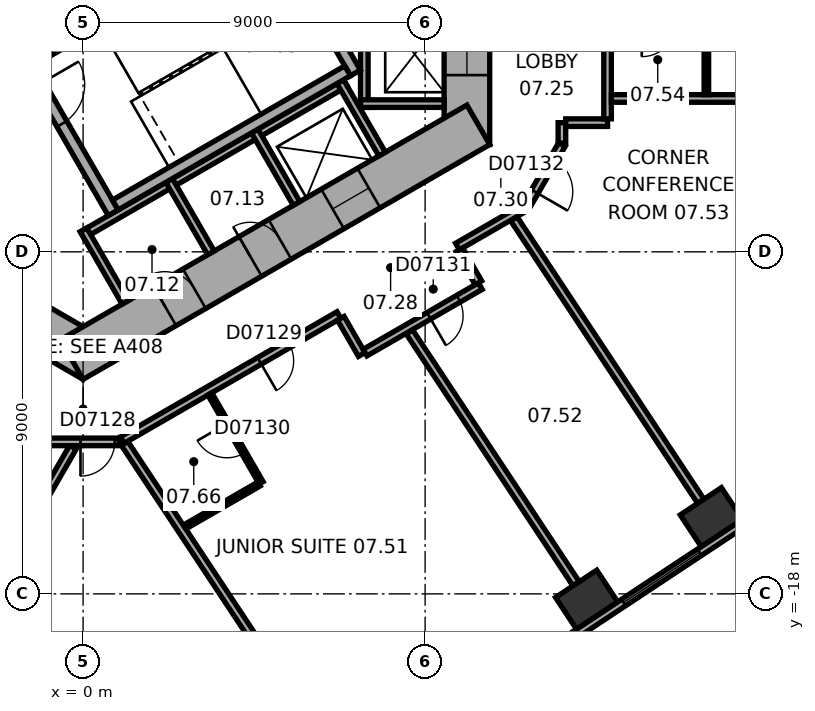
"""IFC4 building model, lengths in metres.
Left out: names, types, materials, properties, quantities, classifications, styles, units other than length and angle.
Written with IfcOpenShell. Run it as: python <this file> out.ifc"""

import sys

from ifc_helpers import new_model, si_unit, direction, frame, frame_2d, origin, origin_2d, place, context, subcontext, project, spatial, rectangle, extrude, element, fill, save


model = new_model("IFC4")
c1 = context("Model", 3, precision=1e-05, world=origin(), true_north=direction((0.0, 1.0)))
c2 = subcontext(c1, "Body", "Model", "MODEL_VIEW")
j1 = project(units=[si_unit("LENGTHUNIT", "METRE"), si_unit("PLANEANGLEUNIT", "RADIAN")], contexts=[c1])
p1 = place(None, origin())
s1 = spatial("IfcSite", under=j1, at=p1, CompositionType="ELEMENT")
p2 = place(p1, origin())
s2 = spatial("IfcBuilding", under=s1, at=p2, CompositionType="ELEMENT")
p3 = place(p2, frame((0.0, 0.0, 44.0)))
s3 = spatial("IfcBuildingStorey", under=s2, at=p3, CompositionType="ELEMENT", Elevation=44.0)
for number, where, z_axis, x_axis in (
    (1, (13.25, -18.152, 0.0), (0.0, 0.0, 1.0), (0.834, 0.552, 0.0)),
    (2, (16.531, -15.981, 0.0), (0.0, 0.0, 1.0), (0.834, 0.552, 0.0)),
):
    element("IfcColumn", number, at=place(p3, frame(where, z_axis=z_axis, x_axis=x_axis)), inside=s3, PredefinedType="COLUMN", context=c2, shape_type="SweptSolid", body=[
        extrude(rectangle(XDim=1.3, YDim=1.0, at=origin_2d()), origin(), (0.0, 0.0, 1.0), 3.3),
    ])
p4 = place(p3, frame((10.1, -6.177, 0.0), z_axis=(0.0, 0.0, 1.0), x_axis=(0.0, 1.0, 0.0)))
e3 = element("IfcWall", 3, at=p4, inside=s3, PredefinedType="SHEAR", context=c2, shape_type="SweptSolid", body=[
    extrude(rectangle(XDim=12.355, YDim=1.2, at=frame_2d((6.177, 0.0))), origin(), (0.0, 0.0, 1.0), 3.3),
])
p5 = place(p4, frame((6.378, 0.0, 0.0)))
e4 = element("IfcOpeningElement", 4, at=p5, cuts=e3, PredefinedType="OPENING", context=c2, shape_type="SweptSolid", body=[
    extrude(rectangle(XDim=1.5, YDim=2.1, at=frame_2d((0.75, 1.05))), frame((0.0, 0.61, 0.0), z_axis=(0.0, -1.0, 0.0), x_axis=(1.0, 0.0, 0.0)), (0.0, 0.0, 1.0), 1.22),
])
p6 = place(p4, frame((1.828, 0.0, 0.0)))
e5 = element("IfcOpeningElement", 5, at=p6, cuts=e3, PredefinedType="OPENING", context=c2, shape_type="SweptSolid", body=[
    extrude(rectangle(XDim=1.1, YDim=2.1, at=frame_2d((0.55, 1.05))), frame((0.0, 0.61, 0.0), z_axis=(0.0, -1.0, 0.0), x_axis=(1.0, 0.0, 0.0)), (0.0, 0.0, 1.0), 1.22),
])
p7 = place(p4, frame((4.427, 0.0, 0.0)))
e6 = element("IfcOpeningElement", 6, at=p7, cuts=e3, PredefinedType="OPENING", context=c2, shape_type="SweptSolid", body=[
    extrude(rectangle(XDim=1.1, YDim=2.1, at=frame_2d((0.55, 1.05))), frame((0.0, 0.61, 0.0), z_axis=(0.0, -1.0, 0.0), x_axis=(1.0, 0.0, 0.0)), (0.0, 0.0, 1.0), 1.22),
])
p8 = place(p3, frame((-10.4, -5.658, 0.0), z_axis=(0.0, 0.0, 1.0), x_axis=(0.866021384402, -0.500006961711, 0.0)))
e7 = element("IfcWall", 7, at=p8, inside=s3, PredefinedType="SHEAR", context=c2, shape_type="SweptSolid", body=[
    extrude(rectangle(XDim=12.355, YDim=1.2, at=frame_2d((6.178, 0.0))), origin(), (0.0, 0.0, 1.0), 3.3),
])
p9 = place(p8, frame((6.378, 0.0, 0.0)))
e8 = element("IfcOpeningElement", 8, at=p9, cuts=e7, PredefinedType="OPENING", context=c2, shape_type="SweptSolid", body=[
    extrude(rectangle(XDim=1.5, YDim=2.1, at=frame_2d((0.75, 1.05))), frame((0.0, 0.61, 0.0), z_axis=(0.0, -1.0, 0.0), x_axis=(1.0, 0.0, 0.0)), (0.0, 0.0, 1.0), 1.22),
])
p10 = place(p8, frame((3.228, 0.0, 0.0)))
e9 = element("IfcOpeningElement", 9, at=p10, cuts=e7, PredefinedType="OPENING", context=c2, shape_type="SweptSolid", body=[
    extrude(rectangle(XDim=0.9, YDim=2.1, at=frame_2d((0.45, 1.05))), frame((0.0, 0.61, 0.0), z_axis=(0.0, -1.0, 0.0), x_axis=(1.0, 0.0, 0.0)), (0.0, 0.0, 1.0), 1.22),
])
p11 = place(p3, frame((-0.3, -11.836, 0.0), z_axis=(0.0, 0.0, 1.0), x_axis=(0.866021384402, 0.500006961711, 0.0)))
e10 = element("IfcWall", 10, at=p11, inside=s3, PredefinedType="SHEAR", context=c2, shape_type="SweptSolid", body=[
    extrude(rectangle(XDim=12.355, YDim=1.2, at=frame_2d((6.178, 0.0))), origin(), (0.0, 0.0, 1.0), 3.3),
])
p12 = place(p11, frame((2.828, 0.0, 0.0)))
e11 = element("IfcOpeningElement", 11, at=p12, cuts=e10, PredefinedType="OPENING", context=c2, shape_type="SweptSolid", body=[
    extrude(rectangle(XDim=0.9, YDim=2.1, at=frame_2d((0.45, 1.05))), frame((0.0, 0.61, 0.0), z_axis=(0.0, -1.0, 0.0), x_axis=(1.0, 0.0, 0.0)), (0.0, 0.0, 1.0), 1.22),
])
p13 = place(p11, frame((5.428, 0.0, 0.0)))
e12 = element("IfcOpeningElement", 12, at=p13, cuts=e10, PredefinedType="OPENING", context=c2, shape_type="SweptSolid", body=[
    extrude(rectangle(XDim=0.9, YDim=2.1, at=frame_2d((0.45, 1.05))), frame((0.0, 0.61, 0.0), z_axis=(0.0, -1.0, 0.0), x_axis=(1.0, 0.0, 0.0)), (0.0, 0.0, 1.0), 1.22),
])
p14 = place(p11, frame((7.928, 0.0, 0.0)))
e13 = element("IfcOpeningElement", 13, at=p14, cuts=e10, PredefinedType="OPENING", context=c2, shape_type="SweptSolid", body=[
    extrude(rectangle(XDim=1.1, YDim=2.1, at=frame_2d((0.55, 1.05))), frame((0.0, 0.61, 0.0), z_axis=(0.0, -1.0, 0.0), x_axis=(1.0, 0.0, 0.0)), (0.0, 0.0, 1.0), 1.22),
])
p15 = place(p3, frame((3.083, -25.601, 0.0), z_axis=(0.0, 0.0, 1.0), x_axis=(0.833884295743, 0.551939291329, 0.0)))
e14 = element("IfcWall", 14, at=p15, inside=s3, PredefinedType="STANDARD", context=c2, shape_type="SweptSolid", body=[
    extrude(rectangle(XDim=21.246, YDim=0.2, at=frame_2d((10.623, 0.0))), origin(), (0.0, 0.0, 1.0), 3.3),
])
p16 = place(p15, frame((1.553, 0.0, 0.8)))
e15 = element("IfcOpeningElement", 15, at=p16, cuts=e14, PredefinedType="OPENING", context=c2, shape_type="SweptSolid", body=[
    extrude(rectangle(XDim=2.4, YDim=1.7, at=frame_2d((1.2, 0.85))), frame((0.0, 0.11, 0.0), z_axis=(0.0, -1.0, 0.0), x_axis=(1.0, 0.0, 0.0)), (0.0, 0.0, 1.0), 0.22),
])
p17 = place(p15, frame((5.488, 0.0, 0.8)))
e16 = element("IfcOpeningElement", 16, at=p17, cuts=e14, PredefinedType="OPENING", context=c2, shape_type="SweptSolid", body=[
    extrude(rectangle(XDim=2.4, YDim=1.7, at=frame_2d((1.2, 0.85))), frame((0.0, 0.11, 0.0), z_axis=(0.0, -1.0, 0.0), x_axis=(1.0, 0.0, 0.0)), (0.0, 0.0, 1.0), 0.22),
])
p18 = place(p15, frame((9.422, 0.0, 0.8)))
e17 = element("IfcOpeningElement", 17, at=p18, cuts=e14, PredefinedType="OPENING", context=c2, shape_type="SweptSolid", body=[
    extrude(rectangle(XDim=2.4, YDim=1.7, at=frame_2d((1.2, 0.85))), frame((0.0, 0.11, 0.0), z_axis=(0.0, -1.0, 0.0), x_axis=(1.0, 0.0, 0.0)), (0.0, 0.0, 1.0), 0.22),
])
p19 = place(p15, frame((13.357, 0.0, 0.8)))
e18 = element("IfcOpeningElement", 18, at=p19, cuts=e14, PredefinedType="OPENING", context=c2, shape_type="SweptSolid", body=[
    extrude(rectangle(XDim=2.4, YDim=1.7, at=frame_2d((1.2, 0.85))), frame((0.0, 0.11, 0.0), z_axis=(0.0, -1.0, 0.0), x_axis=(1.0, 0.0, 0.0)), (0.0, 0.0, 1.0), 0.22),
])
p20 = place(p15, frame((17.291, 0.0, 0.8)))
e19 = element("IfcOpeningElement", 19, at=p20, cuts=e14, PredefinedType="OPENING", context=c2, shape_type="SweptSolid", body=[
    extrude(rectangle(XDim=2.4, YDim=1.7, at=frame_2d((1.2, 0.85))), frame((0.0, 0.11, 0.0), z_axis=(0.0, -1.0, 0.0), x_axis=(1.0, 0.0, 0.0)), (0.0, 0.0, 1.0), 0.22),
])
p21 = place(p3, frame((7.4, -5.2, 0.0), z_axis=(0.0, 0.0, 1.0), x_axis=(0.0, 1.0, 0.0)))
e20 = element("IfcWall", 20, at=p21, inside=s3, PredefinedType="PARTITIONING", context=c2, shape_type="SweptSolid", body=[
    extrude(rectangle(XDim=5.4, YDim=0.2, at=frame_2d((2.7, 0.0))), origin(), (0.0, 0.0, 1.0), 3.05),
])
p22 = place(p3, frame((7.3, -5.1, 0.0), z_axis=(0.0, 0.0, 1.0), x_axis=(1.0, 0.0, 0.0)))
e21 = element("IfcWall", 21, at=p22, inside=s3, PredefinedType="PARTITIONING", context=c2, shape_type="SweptSolid", body=[
    extrude(rectangle(XDim=2.2, YDim=0.2, at=frame_2d((1.1, 0.0))), origin(), (0.0, 0.0, 1.0), 3.05),
])
p23 = place(p3, frame((-0.024, -8.559, 0.0), z_axis=(0.0, 0.0, 1.0), x_axis=(0.866026010844, 0.49999894854, 0.0)))
e22 = element("IfcWall", 22, at=p23, inside=s3, PredefinedType="PARTITIONING", context=c2, shape_type="SweptSolid", body=[
    extrude(rectangle(XDim=8.0, YDim=0.2, at=frame_2d((4.0, 0.0))), origin(), (0.0, 0.0, 1.0), 3.05),
])
for number, where, z_axis, x_axis in (
    (23, (0.013, -8.422, 0.0), (0.0, 0.0, 1.0), (0.5, -0.866, 0.0)),
    (24, (2.264, -7.122, 0.0), (0.0, 0.0, 1.0), (0.5, -0.866, 0.0)),
    (25, (4.516, -5.822, 0.0), (0.0, 0.0, 1.0), (0.5, -0.866, 0.0)),
    (26, (6.768, -4.522, 0.0), (0.0, 0.0, 1.0), (0.5, -0.866, 0.0)),
):
    element("IfcWall", number, at=place(p3, frame(where, z_axis=z_axis, x_axis=x_axis)), inside=s3, PredefinedType="PARTITIONING", context=c2, shape_type="SweptSolid", body=[
        extrude(rectangle(XDim=2.2, YDim=0.2, at=frame_2d((1.1, 0.0))), origin(), (0.0, 0.0, 1.0), 3.05),
    ])
p24 = place(p3, frame((-1.558, -3.902, 0.0), z_axis=(0.0, 0.0, 1.0), x_axis=(0.499977259774, -0.866038532462, 0.0)))
e27 = element("IfcWall", 27, at=p24, inside=s3, PredefinedType="SHEAR", context=c2, shape_type="SweptSolid", body=[
    extrude(rectangle(XDim=4.7, YDim=0.3, at=frame_2d((2.35, 0.0))), origin(), (0.0, 0.0, 1.0), 3.05),
])
p25 = place(p24, frame((0.8, 0.0, 0.0)))
e28 = element("IfcOpeningElement", 28, at=p25, cuts=e27, PredefinedType="OPENING", context=c2, shape_type="SweptSolid", body=[
    extrude(rectangle(XDim=1.2, YDim=2.1, at=frame_2d((0.6, 1.05))), frame((0.0, 0.16, 0.0), z_axis=(0.0, -1.0, 0.0), x_axis=(1.0, 0.0, 0.0)), (0.0, 0.0, 1.0), 0.32),
])
p26 = place(p3, frame((4.816, -0.222, 0.0), z_axis=(0.0, 0.0, 1.0), x_axis=(0.499977259774, -0.866038532462, 0.0)))
e29 = element("IfcWall", 29, at=p26, inside=s3, PredefinedType="SHEAR", context=c2, shape_type="SweptSolid", body=[
    extrude(rectangle(XDim=4.7, YDim=0.3, at=frame_2d((2.35, 0.0))), origin(), (0.0, 0.0, 1.0), 3.05),
])
for number, where, z_axis, x_axis in (
    (30, (-1.353, -3.957, 0.0), (0.0, 0.0, 1.0), (0.866, 0.5, 0.0)),
    (31, (0.847, -7.767, 0.0), (0.0, 0.0, 1.0), (0.866, 0.5, 0.0)),
):
    element("IfcWall", number, at=place(p3, frame(where, z_axis=z_axis, x_axis=x_axis)), inside=s3, PredefinedType="SHEAR", context=c2, shape_type="SweptSolid", body=[
        extrude(rectangle(XDim=7.06, YDim=0.3, at=frame_2d((3.53, 0.0))), origin(), (0.0, 0.0, 1.0), 3.05),
    ])
p27 = place(p3, frame((-5.052, -22.429, 0.0), z_axis=(0.0, 0.0, 1.0), x_axis=(0.500004329283, 0.866022904257, 0.0)))
e32 = element("IfcWall", 32, at=p27, inside=s3, PredefinedType="PARTITIONING", context=c2, shape_type="SweptSolid", body=[
    extrude(rectangle(XDim=9.572, YDim=0.2, at=frame_2d((4.786, 0.0))), origin(), (0.0, 0.0, 1.0), 3.05),
])
p28 = place(p3, frame((-0.91, -14.001, 0.0), z_axis=(0.0, 0.0, 1.0), x_axis=(1.0, 0.0, 0.0)))
e33 = element("IfcWall", 33, at=p28, inside=s3, PredefinedType="PARTITIONING", context=c2, shape_type="SweptSolid", body=[
    extrude(rectangle(XDim=1.86, YDim=0.2, at=frame_2d((0.93, 0.0))), origin(), (0.0, 0.0, 1.0), 3.05),
])
p29 = place(p28, frame((0.842, 0.0, 0.0)))
e34 = element("IfcOpeningElement", 34, at=p29, cuts=e33, PredefinedType="OPENING", context=c2, shape_type="SweptSolid", body=[
    extrude(rectangle(XDim=0.9, YDim=2.1, at=frame_2d((0.45, 1.05))), frame((0.0, 0.11, 0.0), z_axis=(0.0, -1.0, 0.0), x_axis=(1.0, 0.0, 0.0)), (0.0, 0.0, 1.0), 0.22),
])
p30 = place(p3, frame((1.033, -13.953, 0.0), z_axis=(0.0, 0.0, 1.0), x_axis=(0.866017531406, 0.500013635111, 0.0)))
e35 = element("IfcWall", 35, at=p30, inside=s3, PredefinedType="PARTITIONING", context=c2, shape_type="SweptSolid", body=[
    extrude(rectangle(XDim=6.58, YDim=0.2, at=frame_2d((3.29, 0.0))), origin(), (0.0, 0.0, 1.0), 3.05),
])
p31 = place(p30, frame((4.165, 0.0, 0.0)))
e36 = element("IfcOpeningElement", 36, at=p31, cuts=e35, PredefinedType="OPENING", context=c2, shape_type="SweptSolid", body=[
    extrude(rectangle(XDim=0.9, YDim=2.1, at=frame_2d((0.45, 1.05))), frame((0.0, 0.11, 0.0), z_axis=(0.0, -1.0, 0.0), x_axis=(1.0, 0.0, 0.0)), (0.0, 0.0, 1.0), 0.22),
])
p32 = place(p3, frame((3.335, -12.739, 0.0), z_axis=(0.0, 0.0, 1.0), x_axis=(0.499980770555, -0.866036505625, 0.0)))
e37 = element("IfcWall", 37, at=p32, inside=s3, PredefinedType="PARTITIONING", context=c2, shape_type="SweptSolid", body=[
    extrude(rectangle(XDim=2.7, YDim=0.12, at=frame_2d((1.35, 0.0))), origin(), (0.0, 0.0, 1.0), 3.05),
])
p33 = place(p32, frame((0.9, 0.0, 0.0)))
e38 = element("IfcOpeningElement", 38, at=p33, cuts=e37, PredefinedType="OPENING", context=c2, shape_type="SweptSolid", body=[
    extrude(rectangle(XDim=0.9, YDim=2.1, at=frame_2d((0.45, 1.05))), frame((0.0, 0.07, 0.0), z_axis=(0.0, -1.0, 0.0), x_axis=(1.0, 0.0, 0.0)), (0.0, 0.0, 1.0), 0.14),
])
p34 = place(p3, frame((4.633, -15.107, 0.0), z_axis=(0.0, 0.0, 1.0), x_axis=(-0.866022496617, -0.500005035328, 0.0)))
e39 = element("IfcWall", 39, at=p34, inside=s3, PredefinedType="PARTITIONING", context=c2, shape_type="SweptSolid", body=[
    extrude(rectangle(XDim=2.269, YDim=0.12, at=frame_2d((1.134, 0.0))), origin(), (0.0, 0.0, 1.0), 3.05),
])
p35 = place(p3, frame((6.412, -22.079, 0.0), z_axis=(0.0, 0.0, 1.0), x_axis=(-0.551919507115, 0.83389739037, 0.0)))
e40 = element("IfcWall", 40, at=p35, inside=s3, PredefinedType="PARTITIONING", context=c2, shape_type="SweptSolid", body=[
    extrude(rectangle(XDim=9.635, YDim=0.2, at=frame_2d((4.817, 0.0))), origin(), (0.0, 0.0, 1.0), 3.05),
])
p36 = place(p3, frame((6.782, -10.749, 0.0), z_axis=(0.0, 0.0, 1.0), x_axis=(0.500074377092, -0.865982457891, 0.0)))
e41 = element("IfcWall", 41, at=p36, inside=s3, PredefinedType="PARTITIONING", context=c2, shape_type="SweptSolid", body=[
    extrude(rectangle(XDim=1.101, YDim=0.2, at=frame_2d((0.55, 0.0))), origin(), (0.0, 0.0, 1.0), 3.05),
])
p37 = place(p3, frame((7.419, -11.653, 0.0), z_axis=(0.0, 0.0, 1.0), x_axis=(0.866038154057, 0.49997791523, 0.0)))
e42 = element("IfcWall", 42, at=p37, inside=s3, PredefinedType="PARTITIONING", context=c2, shape_type="SweptSolid", body=[
    extrude(rectangle(XDim=3.502, YDim=0.2, at=frame_2d((1.751, 0.0))), origin(), (0.0, 0.0, 1.0), 3.05),
])
p38 = place(p37, frame((1.94, 0.0, 0.0)))
e43 = element("IfcOpeningElement", 43, at=p38, cuts=e42, PredefinedType="OPENING", context=c2, shape_type="SweptSolid", body=[
    extrude(rectangle(XDim=0.9, YDim=2.1, at=frame_2d((0.45, 1.05))), frame((0.0, 0.11, 0.0), z_axis=(0.0, -1.0, 0.0), x_axis=(1.0, 0.0, 0.0)), (0.0, 0.0, 1.0), 0.22),
])
p39 = place(p3, frame((9.852, -8.861, 0.0), z_axis=(0.0, 0.0, 1.0), x_axis=(0.866013291437, 0.500020978615, 0.0)))
e44 = element("IfcWall", 44, at=p39, inside=s3, PredefinedType="PARTITIONING", context=c2, shape_type="SweptSolid", body=[
    extrude(rectangle(XDim=2.077, YDim=0.2, at=frame_2d((1.038, 0.0))), origin(), (0.0, 0.0, 1.0), 3.05),
])
p40 = place(p3, frame((10.402, -9.815, 0.0), z_axis=(0.0, 0.0, 1.0), x_axis=(-0.499968756647, 0.866043441391, 0.0)))
e45 = element("IfcWall", 45, at=p40, inside=s3, PredefinedType="PARTITIONING", context=c2, shape_type="SweptSolid", body=[
    extrude(rectangle(XDim=1.001, YDim=0.2, at=frame_2d((0.5, 0.0))), origin(), (0.0, 0.0, 1.0), 3.05),
])
p41 = place(p3, frame((11.67, -7.788, 0.0), z_axis=(0.0, 0.0, 1.0), x_axis=(0.500063286585, 0.865988862174, 0.0)))
e46 = element("IfcWall", 46, at=p41, inside=s3, PredefinedType="PARTITIONING", context=c2, shape_type="SweptSolid", body=[
    extrude(rectangle(XDim=1.86, YDim=0.2, at=frame_2d((0.93, 0.0))), origin(), (0.0, 0.0, 1.0), 3.05),
])
p42 = place(p41, frame((0.43, 0.0, 0.0)))
e47 = element("IfcOpeningElement", 47, at=p42, cuts=e46, PredefinedType="OPENING", context=c2, shape_type="SweptSolid", body=[
    extrude(rectangle(XDim=1.0, YDim=2.1, at=frame_2d((0.5, 1.05))), frame((0.0, 0.11, 0.0), z_axis=(0.0, -1.0, 0.0), x_axis=(1.0, 0.0, 0.0)), (0.0, 0.0, 1.0), 0.22),
])
p43 = place(p3, frame((12.6, -6.138, 0.0), z_axis=(0.0, 0.0, 1.0), x_axis=(0.0, 1.0, 0.0)))
e48 = element("IfcWall", 48, at=p43, inside=s3, PredefinedType="PARTITIONING", context=c2, shape_type="SweptSolid", body=[
    extrude(rectangle(XDim=0.537, YDim=0.2, at=frame_2d((0.268, 0.0))), origin(), (0.0, 0.0, 1.0), 3.05),
])
p44 = place(p3, frame((12.7, -5.601, 0.0), z_axis=(0.0, 0.0, 1.0), x_axis=(1.0, 0.0, 0.0)))
e49 = element("IfcWall", 49, at=p44, inside=s3, PredefinedType="PARTITIONING", context=c2, shape_type="SweptSolid", body=[
    extrude(rectangle(XDim=1.101, YDim=0.2, at=frame_2d((0.551, 0.0))), origin(), (0.0, 0.0, 1.0), 3.05),
])
p45 = place(p3, frame((12.974, -17.735, 0.0), z_axis=(0.0, 0.0, 1.0), x_axis=(-0.55192625685, 0.833892922982, 0.0)))
e50 = element("IfcWall", 50, at=p45, inside=s3, PredefinedType="PARTITIONING", context=c2, shape_type="SweptSolid", body=[
    extrude(rectangle(XDim=7.95, YDim=0.2, at=frame_2d((3.975, 0.0))), origin(), (0.0, 0.0, 1.0), 3.05),
])
p46 = place(p3, frame((13.801, -5.501, 0.0), z_axis=(0.0, 0.0, 1.0), x_axis=(0.0, 1.0, 0.0)))
e51 = element("IfcWall", 51, at=p46, inside=s3, PredefinedType="PARTITIONING", context=c2, shape_type="SweptSolid", body=[
    extrude(rectangle(XDim=5.702, YDim=0.2, at=frame_2d((2.851, 0.0))), origin(), (0.0, 0.0, 1.0), 3.05),
])
p47 = place(p46, frame((3.079, 0.0, 0.0)))
e52 = element("IfcOpeningElement", 52, at=p47, cuts=e51, PredefinedType="OPENING", context=c2, shape_type="SweptSolid", body=[
    extrude(rectangle(XDim=0.9, YDim=2.1, at=frame_2d((0.45, 1.05))), frame((0.0, 0.11, 0.0), z_axis=(0.0, -1.0, 0.0), x_axis=(1.0, 0.0, 0.0)), (0.0, 0.0, 1.0), 0.22),
])
p48 = place(p46, frame((4.636, 0.0, 0.0)))
e53 = element("IfcOpeningElement", 53, at=p48, cuts=e51, PredefinedType="OPENING", context=c2, shape_type="SweptSolid", body=[
    extrude(rectangle(XDim=0.9, YDim=2.1, at=frame_2d((0.45, 1.05))), frame((0.0, 0.11, 0.0), z_axis=(0.0, -1.0, 0.0), x_axis=(1.0, 0.0, 0.0)), (0.0, 0.0, 1.0), 0.22),
])
p49 = place(p3, frame((13.901, -4.965, 0.0), z_axis=(0.0, 0.0, 1.0), x_axis=(1.0, 0.0, 0.0)))
e54 = element("IfcWall", 54, at=p49, inside=s3, PredefinedType="PARTITIONING", context=c2, shape_type="SweptSolid", body=[
    extrude(rectangle(XDim=8.049, YDim=0.2, at=frame_2d((4.024, 0.0))), origin(), (0.0, 0.0, 1.0), 3.05),
])
p50 = place(p3, frame((16.255, -15.564, 0.0), z_axis=(0.0, 0.0, 1.0), x_axis=(-0.55192208744, 0.833895682562, 0.0)))
e55 = element("IfcWall", 55, at=p50, inside=s3, PredefinedType="PARTITIONING", context=c2, shape_type="SweptSolid", body=[
    extrude(rectangle(XDim=8.913, YDim=0.2, at=frame_2d((4.457, 0.0))), origin(), (0.0, 0.0, 1.0), 2.6),
])
p51 = place(p3, frame((16.401, -3.025, 0.0), z_axis=(0.0, 0.0, 1.0), x_axis=(0.0, -1.0, 0.0)))
e56 = element("IfcWall", 56, at=p51, inside=s3, PredefinedType="PARTITIONING", context=c2, shape_type="SweptSolid", body=[
    extrude(rectangle(XDim=1.84, YDim=0.12, at=frame_2d((0.92, 0.0))), origin(), (0.0, 0.0, 1.0), 3.05),
])
p52 = place(p19, origin())
e57 = element("IfcWindow", 57, at=p52, inside=s3, PartitioningType="SINGLE_PANEL", PredefinedType="WINDOW", context=c2, shape_type="SweptSolid", body=[
    extrude(rectangle(XDim=2.4, YDim=1.7, at=frame_2d((1.2, 0.85))), frame((0.0, 0.03, 0.0), z_axis=(0.0, -1.0, 0.0), x_axis=(1.0, 0.0, 0.0)), (0.0, 0.0, 1.0), 0.06),
])
fill(e18, e57)
p53 = place(p25, origin())
e58 = element("IfcDoor", 58, at=p53, inside=s3, OperationType="SINGLE_SWING_RIGHT", PredefinedType="DOOR", context=c2, shape_type="SweptSolid", body=[
    extrude(rectangle(XDim=1.2, YDim=2.1, at=frame_2d((0.6, 1.05))), frame((0.0, 0.025, 0.0), z_axis=(0.0, -1.0, 0.0), x_axis=(1.0, 0.0, 0.0)), (0.0, 0.0, 1.0), 0.05),
])
fill(e28, e58)
p54 = place(p12, origin())
e59 = element("IfcDoor", 59, at=p54, inside=s3, OperationType="SINGLE_SWING_LEFT", PredefinedType="DOOR", context=c2, shape_type="SweptSolid", body=[
    extrude(rectangle(XDim=0.9, YDim=2.1, at=frame_2d((0.45, 1.05))), frame((0.0, 0.025, 0.0), z_axis=(0.0, -1.0, 0.0), x_axis=(1.0, 0.0, 0.0)), (0.0, 0.0, 1.0), 0.05),
])
fill(e11, e59)
p55 = place(p13, origin())
e60 = element("IfcDoor", 60, at=p55, inside=s3, OperationType="SINGLE_SWING_LEFT", PredefinedType="DOOR", context=c2, shape_type="SweptSolid", body=[
    extrude(rectangle(XDim=0.9, YDim=2.1, at=frame_2d((0.45, 1.05))), frame((0.0, 0.025, 0.0), z_axis=(0.0, -1.0, 0.0), x_axis=(1.0, 0.0, 0.0)), (0.0, 0.0, 1.0), 0.05),
])
fill(e12, e60)
p56 = place(p6, origin())
e61 = element("IfcDoor", 61, at=p56, inside=s3, OperationType="DOUBLE_DOOR_SLIDING", PredefinedType="DOOR", context=c2, shape_type="SweptSolid", body=[
    extrude(rectangle(XDim=1.1, YDim=2.1, at=frame_2d((0.55, 1.05))), frame((0.0, 0.025, 0.0), z_axis=(0.0, -1.0, 0.0), x_axis=(1.0, 0.0, 0.0)), (0.0, 0.0, 1.0), 0.05),
])
fill(e5, e61)
p57 = place(p14, origin())
e62 = element("IfcDoor", 62, at=p57, inside=s3, OperationType="DOUBLE_DOOR_SLIDING", PredefinedType="DOOR", context=c2, shape_type="SweptSolid", body=[
    extrude(rectangle(XDim=1.1, YDim=2.1, at=frame_2d((0.55, 1.05))), frame((0.0, 0.025, 0.0), z_axis=(0.0, -1.0, 0.0), x_axis=(1.0, 0.0, 0.0)), (0.0, 0.0, 1.0), 0.05),
])
fill(e13, e62)
p58 = place(p29, origin())
e63 = element("IfcDoor", 63, at=p58, inside=s3, OperationType="SINGLE_SWING_LEFT", PredefinedType="DOOR", context=c2, shape_type="SweptSolid", body=[
    extrude(rectangle(XDim=0.9, YDim=2.1, at=frame_2d((0.45, 1.05))), frame((0.0, 0.025, 0.0), z_axis=(0.0, -1.0, 0.0), x_axis=(1.0, 0.0, 0.0)), (0.0, 0.0, 1.0), 0.05),
])
fill(e34, e63)
p59 = place(p31, origin())
e64 = element("IfcDoor", 64, at=p59, inside=s3, OperationType="SINGLE_SWING_LEFT", PredefinedType="DOOR", context=c2, shape_type="SweptSolid", body=[
    extrude(rectangle(XDim=0.9, YDim=2.1, at=frame_2d((0.45, 1.05))), frame((0.0, 0.025, 0.0), z_axis=(0.0, -1.0, 0.0), x_axis=(1.0, 0.0, 0.0)), (0.0, 0.0, 1.0), 0.05),
])
fill(e36, e64)
p60 = place(p33, origin())
e65 = element("IfcDoor", 65, at=p60, inside=s3, OperationType="SINGLE_SWING_LEFT", PredefinedType="DOOR", context=c2, shape_type="SweptSolid", body=[
    extrude(rectangle(XDim=0.9, YDim=2.1, at=frame_2d((0.45, 1.05))), frame((0.0, 0.025, 0.0), z_axis=(0.0, -1.0, 0.0), x_axis=(1.0, 0.0, 0.0)), (0.0, 0.0, 1.0), 0.05),
])
fill(e38, e65)
p61 = place(p38, origin())
e66 = element("IfcDoor", 66, at=p61, inside=s3, OperationType="SINGLE_SWING_LEFT", PredefinedType="DOOR", context=c2, shape_type="SweptSolid", body=[
    extrude(rectangle(XDim=0.9, YDim=2.1, at=frame_2d((0.45, 1.05))), frame((0.0, 0.025, 0.0), z_axis=(0.0, -1.0, 0.0), x_axis=(1.0, 0.0, 0.0)), (0.0, 0.0, 1.0), 0.05),
])
fill(e43, e66)
p62 = place(p42, origin())
e67 = element("IfcDoor", 67, at=p62, inside=s3, OperationType="SINGLE_SWING_LEFT", PredefinedType="DOOR", context=c2, shape_type="SweptSolid", body=[
    extrude(rectangle(XDim=1.0, YDim=2.1, at=frame_2d((0.5, 1.05))), frame((0.0, 0.025, 0.0), z_axis=(0.0, -1.0, 0.0), x_axis=(1.0, 0.0, 0.0)), (0.0, 0.0, 1.0), 0.05),
])
fill(e47, e67)
save(model, sys.argv[1])
